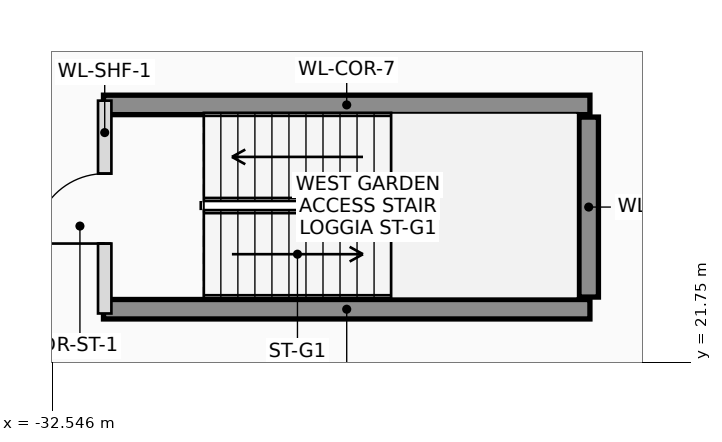
"""IFC4 building model, lengths in metres.
Left out: names, types, materials, properties, quantities, classifications, styles, units other than length and angle.
Written with IfcOpenShell. Run it as: python <this file> out.ifc"""

import sys

from ifc_helpers import new_model, si_unit, direction, frame, frame_2d, origin, place, context, subcontext, project, spatial, rectangle, extrude, element, fill, save


model = new_model("IFC4")
c1 = context("Model", 3, precision=1e-05, world=origin(), true_north=direction((0.0, 1.0)))
c2 = subcontext(c1, "Body", "Model", "MODEL_VIEW")
j1 = project(units=[si_unit("LENGTHUNIT", "METRE"), si_unit("PLANEANGLEUNIT", "RADIAN")], contexts=[c1])
p1 = place(None, origin())
s1 = spatial("IfcSite", under=j1, at=p1, CompositionType="ELEMENT")
p2 = place(p1, origin())
s2 = spatial("IfcBuilding", under=s1, at=p2, CompositionType="ELEMENT")
p3 = place(p2, frame((0.0, 0.0, 4.5)))
s3 = spatial("IfcBuildingStorey", under=s2, at=p3, CompositionType="ELEMENT", Elevation=4.5)
for number, where, z_axis, x_axis in (
    (1, (-31.7, 25.98, 0.0), (0.0, 0.0, 1.0), (1.0, 0.0, 0.0)),
    (2, (-31.7, 22.62, 0.0), (0.0, 0.0, 1.0), (1.0, 0.0, 0.0)),
):
    element("IfcWall", number, at=place(p3, frame(where, z_axis=z_axis, x_axis=x_axis)), inside=s3, PredefinedType="SHEAR", context=c2, shape_type="SweptSolid", body=[
        extrude(rectangle(XDim=8.0, YDim=0.32, at=frame_2d((4.0, 0.0))), origin(), (0.0, 0.0, 1.0), 3.9),
    ])
p4 = place(p3, frame((-23.72, 22.82, 0.0), z_axis=(0.0, 0.0, 1.0), x_axis=(0.0, 1.0, 0.0)))
e3 = element("IfcWall", 3, at=p4, inside=s3, PredefinedType="SHEAR", context=c2, shape_type="SweptSolid", body=[
    extrude(rectangle(XDim=2.96, YDim=0.32, at=frame_2d((1.48, 0.0))), origin(), (0.0, 0.0, 1.0), 3.9),
])
p5 = place(p3, frame((-31.68, 22.55, 0.0), z_axis=(0.0, 0.0, 1.0), x_axis=(0.0, 1.0, 0.0)))
e4 = element("IfcWall", 4, at=p5, inside=s3, PredefinedType="PLUMBINGWALL", context=c2, shape_type="SweptSolid", body=[
    extrude(rectangle(XDim=3.5, YDim=0.22, at=frame_2d((1.75, 0.0))), origin(), (0.0, 0.0, 1.0), 3.57),
])
p6 = place(p5, frame((1.15, 0.0, 0.0)))
e5 = element("IfcOpeningElement", 5, at=p6, cuts=e4, PredefinedType="OPENING", context=c2, shape_type="SweptSolid", body=[
    extrude(rectangle(XDim=1.15, YDim=2.15, at=frame_2d((0.575, 1.075))), frame((0.0, 0.12, 0.0), z_axis=(0.0, -1.0, 0.0), x_axis=(1.0, 0.0, 0.0)), (0.0, 0.0, 1.0), 0.24),
])
p7 = place(p6, origin())
e6 = element("IfcDoor", 6, at=p7, inside=s3, OperationType="SINGLE_SWING_LEFT", PredefinedType="DOOR", context=c2, shape_type="SweptSolid", body=[
    extrude(rectangle(XDim=1.15, YDim=2.15, at=frame_2d((0.575, 1.075))), frame((0.0, 0.025, 0.0), z_axis=(0.0, -1.0, 0.0), x_axis=(1.0, 0.0, 0.0)), (0.0, 0.0, 1.0), 0.05),
])
fill(e5, e6)
save(model, sys.argv[1])
